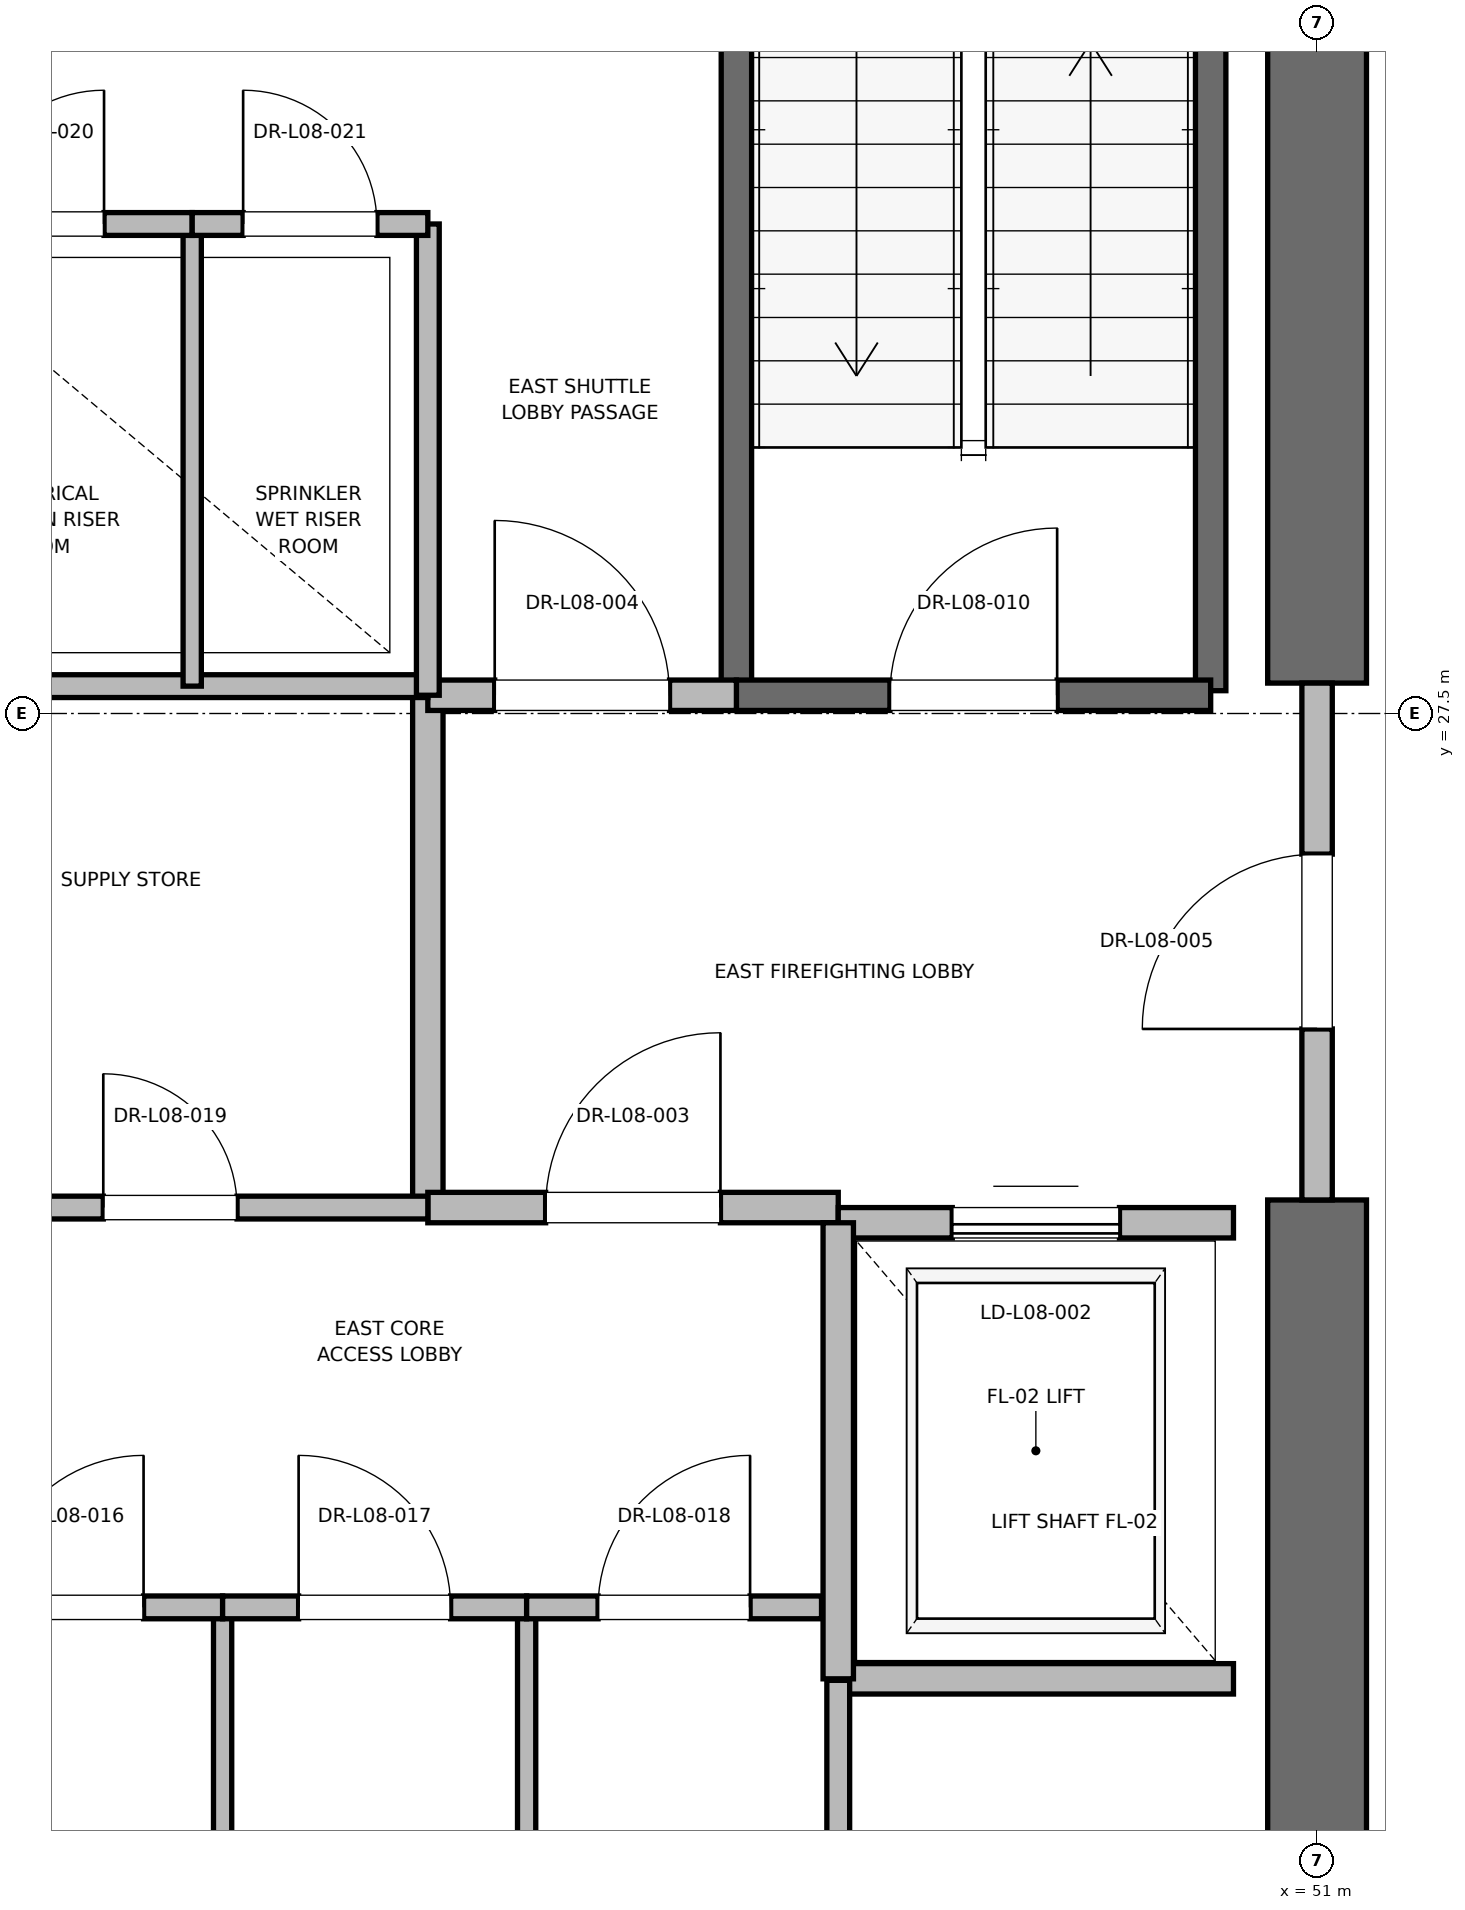
"""IFC4 building model, lengths in metres.
Left out: names, types, materials, properties, quantities, classifications, styles, units other than length and angle.
Written with IfcOpenShell. Run it as: python <this file> out.ifc"""

import sys

from ifc_helpers import new_model, si_unit, direction, frame, frame_2d, origin, place, context, subcontext, project, spatial, rectangle, extrude, element, fill, save


model = new_model("IFC4")
c1 = context("Model", 3, precision=1e-05, world=origin(), true_north=direction((0.0, 1.0)))
c2 = subcontext(c1, "Body", "Model", "MODEL_VIEW")
j1 = project(units=[si_unit("LENGTHUNIT", "METRE"), si_unit("PLANEANGLEUNIT", "RADIAN")], contexts=[c1])
p1 = place(None, origin())
s1 = spatial("IfcSite", under=j1, at=p1, CompositionType="ELEMENT")
p2 = place(p1, origin())
s2 = spatial("IfcBuilding", under=s1, at=p2, CompositionType="ELEMENT")
p3 = place(p2, frame((0.0, 0.0, 39.6)))
s3 = spatial("IfcBuildingStorey", under=s2, at=p3, CompositionType="ELEMENT", Elevation=39.6)
p4 = place(p3, frame((51.0, 18.5, 0.0), z_axis=(0.0, 0.0, 1.0), x_axis=(0.0, 1.0, 0.0)))
e1 = element("IfcWall", 1, at=p4, inside=s3, PredefinedType="SHEAR", context=c2, shape_type="SweptSolid", body=[
    extrude(rectangle(XDim=5.8, YDim=0.65, at=frame_2d((2.9, 0.0))), origin(), (0.0, 0.0, 1.0), 3.76),
])
p5 = place(p3, frame((51.0, 27.7, 0.0), z_axis=(0.0, 0.0, 1.0), x_axis=(0.0, 1.0, 0.0)))
e2 = element("IfcWall", 2, at=p5, inside=s3, PredefinedType="SHEAR", context=c2, shape_type="SweptSolid", body=[
    extrude(rectangle(XDim=8.8, YDim=0.65, at=frame_2d((4.4, 0.0))), origin(), (0.0, 0.0, 1.0), 3.76),
])
p6 = place(p3, frame((50.3, 27.65, 0.0), z_axis=(0.0, 0.0, 1.0), x_axis=(0.0, 1.0, 0.0)))
e3 = element("IfcWall", 3, at=p6, inside=s3, PredefinedType="SOLIDWALL", context=c2, shape_type="SweptSolid", body=[
    extrude(rectangle(XDim=8.15, YDim=0.2, at=frame_2d((4.075, 0.0))), origin(), (0.0, 0.0, 1.0), 3.76),
])
p7 = place(p3, frame((47.18, 27.62, 0.0), z_axis=(0.0, 0.0, 1.0), x_axis=(0.0, 1.0, 0.0)))
e4 = element("IfcWall", 4, at=p7, inside=s3, PredefinedType="SOLIDWALL", context=c2, shape_type="SweptSolid", body=[
    extrude(rectangle(XDim=8.18, YDim=0.2, at=frame_2d((4.09, 0.0))), origin(), (0.0, 0.0, 1.0), 3.76),
])
p8 = place(p3, frame((47.18, 27.62, 0.0), z_axis=(0.0, 0.0, 1.0), x_axis=(1.0, 0.0, 0.0)))
e5 = element("IfcWall", 5, at=p8, inside=s3, PredefinedType="SOLIDWALL", context=c2, shape_type="SweptSolid", body=[
    extrude(rectangle(XDim=3.12, YDim=0.2, at=frame_2d((1.56, 0.0))), origin(), (0.0, 0.0, 1.0), 3.76),
])
p9 = place(p8, frame((1.01, 0.0, 0.0)))
e6 = element("IfcOpeningElement", 6, at=p9, cuts=e5, PredefinedType="OPENING", context=c2, shape_type="SweptSolid", body=[
    extrude(rectangle(XDim=1.1, YDim=2.15, at=frame_2d((0.55, 1.075))), frame((0.0, 0.1, 0.0), z_axis=(0.0, -1.0, 0.0), x_axis=(1.0, 0.0, 0.0)), (0.0, 0.0, 1.0), 0.2),
])
p10 = place(p3, frame((45.15, 24.25, 0.0), z_axis=(0.0, 0.0, 1.0), x_axis=(0.0, 1.0, 0.0)))
e7 = element("IfcWall", 7, at=p10, inside=s3, PredefinedType="PARTITIONING", context=c2, shape_type="SweptSolid", body=[
    extrude(rectangle(XDim=3.37, YDim=0.2, at=frame_2d((1.685, 0.0))), origin(), (0.0, 0.0, 1.0), 3.76),
])
p11 = place(p3, frame((45.15, 24.25, 0.0), z_axis=(0.0, 0.0, 1.0), x_axis=(1.0, 0.0, 0.0)))
e8 = element("IfcWall", 8, at=p11, inside=s3, PredefinedType="PARTITIONING", context=c2, shape_type="SweptSolid", body=[
    extrude(rectangle(XDim=2.7, YDim=0.2, at=frame_2d((1.35, 0.0))), origin(), (0.0, 0.0, 1.0), 3.76),
])
p12 = place(p11, frame((0.775, 0.0, 0.0)))
e9 = element("IfcOpeningElement", 9, at=p12, cuts=e8, PredefinedType="OPENING", context=c2, shape_type="SweptSolid", body=[
    extrude(rectangle(XDim=1.15, YDim=2.2, at=frame_2d((0.575, 1.1))), frame((0.0, 0.1, 0.0), z_axis=(0.0, -1.0, 0.0), x_axis=(1.0, 0.0, 0.0)), (0.0, 0.0, 1.0), 0.2),
])
p13 = place(p3, frame((45.15, 27.62, 0.0), z_axis=(0.0, 0.0, 1.0), x_axis=(1.0, 0.0, 0.0)))
e10 = element("IfcWall", 10, at=p13, inside=s3, PredefinedType="PARTITIONING", context=c2, shape_type="SweptSolid", body=[
    extrude(rectangle(XDim=2.03, YDim=0.2, at=frame_2d((1.015, 0.0))), origin(), (0.0, 0.0, 1.0), 3.76),
])
p14 = place(p13, frame((0.44, 0.0, 0.0)))
e11 = element("IfcOpeningElement", 11, at=p14, cuts=e10, PredefinedType="OPENING", context=c2, shape_type="SweptSolid", body=[
    extrude(rectangle(XDim=1.15, YDim=2.2, at=frame_2d((0.575, 1.1))), frame((0.0, 0.1, 0.0), z_axis=(0.0, -1.0, 0.0), x_axis=(1.0, 0.0, 0.0)), (0.0, 0.0, 1.0), 0.2),
])
p15 = place(p3, frame((51.0, 24.3, 0.0), z_axis=(0.0, 0.0, 1.0), x_axis=(0.0, 1.0, 0.0)))
e12 = element("IfcWall", 12, at=p15, inside=s3, PredefinedType="PARTITIONING", context=c2, shape_type="SweptSolid", body=[
    extrude(rectangle(XDim=3.4, YDim=0.2, at=frame_2d((1.7, 0.0))), origin(), (0.0, 0.0, 1.0), 2.54),
])
p16 = place(p15, frame((1.125, 0.0, 0.0)))
e13 = element("IfcOpeningElement", 13, at=p16, cuts=e12, PredefinedType="OPENING", context=c2, shape_type="SweptSolid", body=[
    extrude(rectangle(XDim=1.15, YDim=2.2, at=frame_2d((0.575, 1.1))), frame((0.0, 0.1, 0.0), z_axis=(0.0, -1.0, 0.0), x_axis=(1.0, 0.0, 0.0)), (0.0, 0.0, 1.0), 0.2),
])
p17 = place(p3, frame((47.85, 21.15, 0.0), z_axis=(0.0, 0.0, 1.0), x_axis=(1.0, 0.0, 0.0)))
e14 = element("IfcWall", 14, at=p17, inside=s3, PredefinedType="SOLIDWALL", context=c2, shape_type="SweptSolid", body=[
    extrude(rectangle(XDim=2.6, YDim=0.2, at=frame_2d((1.3, 0.0))), origin(), (0.0, 0.0, 1.0), 3.76),
])
p18 = place(p3, frame((50.45, 24.15, 0.0), z_axis=(0.0, 0.0, 1.0), x_axis=(-1.0, 0.0, 0.0)))
e15 = element("IfcWall", 15, at=p18, inside=s3, PredefinedType="SOLIDWALL", context=c2, shape_type="SweptSolid", body=[
    extrude(rectangle(XDim=2.6, YDim=0.2, at=frame_2d((1.3, 0.0))), origin(), (0.0, 0.0, 1.0), 2.54),
])
p19 = place(p18, frame((0.75, 0.0, 0.0)))
e16 = element("IfcOpeningElement", 16, at=p19, cuts=e15, PredefinedType="OPENING", context=c2, shape_type="SweptSolid", body=[
    extrude(rectangle(XDim=1.1, YDim=2.2, at=frame_2d((0.55, 1.1))), frame((0.0, 0.1, 0.0), z_axis=(0.0, -1.0, 0.0), x_axis=(1.0, 0.0, 0.0)), (0.0, 0.0, 1.0), 0.2),
])
p20 = place(p3, frame((47.85, 24.15, 0.0), z_axis=(0.0, 0.0, 1.0), x_axis=(0.0, -1.0, 0.0)))
e17 = element("IfcWall", 17, at=p20, inside=s3, PredefinedType="SOLIDWALL", context=c2, shape_type="SweptSolid", body=[
    extrude(rectangle(XDim=3.0, YDim=0.2, at=frame_2d((1.5, 0.0))), origin(), (0.0, 0.0, 1.0), 3.76),
])
p21 = place(p3, frame((41.56, 27.68, 0.0), z_axis=(0.0, 0.0, 1.0), x_axis=(1.0, 0.0, 0.0)))
e18 = element("IfcWall", 18, at=p21, inside=s3, PredefinedType="PARTITIONING", context=c2, shape_type="SweptSolid", body=[
    extrude(rectangle(XDim=3.59, YDim=0.15, at=frame_2d((1.795, 0.0))), origin(), (0.0, 0.0, 1.0), 2.85),
])
p22 = place(p3, frame((47.85, 18.6, 0.0), z_axis=(0.0, 0.0, 1.0), x_axis=(0.0, 1.0, 0.0)))
e19 = element("IfcWall", 19, at=p22, inside=s3, PredefinedType="PARTITIONING", context=c2, shape_type="SweptSolid", body=[
    extrude(rectangle(XDim=2.54, YDim=0.15, at=frame_2d((1.27, 0.0))), origin(), (0.0, 0.0, 1.0), 2.85),
])
for number, where, z_axis, x_axis in (
    (20, (43.8, 18.6, 0.0), (0.0, 0.0, 1.0), (0.0, 1.0, 0.0)),
    (21, (45.8, 18.6, 0.0), (0.0, 0.0, 1.0), (0.0, 1.0, 0.0)),
):
    element("IfcWall", number, at=place(p3, frame(where, z_axis=z_axis, x_axis=x_axis)), inside=s3, PredefinedType="PARTITIONING", context=c2, shape_type="SweptSolid", body=[
        extrude(rectangle(XDim=3.02, YDim=0.12, at=frame_2d((1.51, 0.0))), origin(), (0.0, 0.0, 1.0), 2.85),
    ])
p23 = place(p3, frame((41.76, 21.62, 0.0), z_axis=(0.0, 0.0, 1.0), x_axis=(1.0, 0.0, 0.0)))
e22 = element("IfcWall", 22, at=p23, inside=s3, PredefinedType="PARTITIONING", context=c2, shape_type="SweptSolid", body=[
    extrude(rectangle(XDim=2.04, YDim=0.15, at=frame_2d((1.02, 0.0))), origin(), (0.0, 0.0, 1.0), 2.85),
])
p24 = place(p23, frame((0.52, 0.0, 0.0)))
e23 = element("IfcOpeningElement", 23, at=p24, cuts=e22, PredefinedType="OPENING", context=c2, shape_type="SweptSolid", body=[
    extrude(rectangle(XDim=1.0, YDim=2.15, at=frame_2d((0.5, 1.075))), frame((0.0, 0.075, 0.0), z_axis=(0.0, -1.0, 0.0), x_axis=(1.0, 0.0, 0.0)), (0.0, 0.0, 1.0), 0.15),
])
p25 = place(p3, frame((43.8, 21.62, 0.0), z_axis=(0.0, 0.0, 1.0), x_axis=(1.0, 0.0, 0.0)))
e24 = element("IfcWall", 24, at=p25, inside=s3, PredefinedType="PARTITIONING", context=c2, shape_type="SweptSolid", body=[
    extrude(rectangle(XDim=2.0, YDim=0.15, at=frame_2d((1.0, 0.0))), origin(), (0.0, 0.0, 1.0), 2.85),
])
p26 = place(p25, frame((0.5, 0.0, 0.0)))
e25 = element("IfcOpeningElement", 25, at=p26, cuts=e24, PredefinedType="OPENING", context=c2, shape_type="SweptSolid", body=[
    extrude(rectangle(XDim=1.0, YDim=2.15, at=frame_2d((0.5, 1.075))), frame((0.0, 0.075, 0.0), z_axis=(0.0, -1.0, 0.0), x_axis=(1.0, 0.0, 0.0)), (0.0, 0.0, 1.0), 0.15),
])
p27 = place(p3, frame((45.8, 21.62, 0.0), z_axis=(0.0, 0.0, 1.0), x_axis=(1.0, 0.0, 0.0)))
e26 = element("IfcWall", 26, at=p27, inside=s3, PredefinedType="PARTITIONING", context=c2, shape_type="SweptSolid", body=[
    extrude(rectangle(XDim=1.94, YDim=0.15, at=frame_2d((0.97, 0.0))), origin(), (0.0, 0.0, 1.0), 2.85),
])
p28 = place(p27, frame((0.47, 0.0, 0.0)))
e27 = element("IfcOpeningElement", 27, at=p28, cuts=e26, PredefinedType="OPENING", context=c2, shape_type="SweptSolid", body=[
    extrude(rectangle(XDim=1.0, YDim=2.15, at=frame_2d((0.5, 1.075))), frame((0.0, 0.075, 0.0), z_axis=(0.0, -1.0, 0.0), x_axis=(1.0, 0.0, 0.0)), (0.0, 0.0, 1.0), 0.15),
])
p29 = place(p3, frame((41.76, 24.25, 0.0), z_axis=(0.0, 0.0, 1.0), x_axis=(1.0, 0.0, 0.0)))
e28 = element("IfcWall", 28, at=p29, inside=s3, PredefinedType="PARTITIONING", context=c2, shape_type="SweptSolid", body=[
    extrude(rectangle(XDim=3.39, YDim=0.15, at=frame_2d((1.695, 0.0))), origin(), (0.0, 0.0, 1.0), 2.85),
])
p30 = place(p29, frame((1.255, 0.0, 0.0)))
e29 = element("IfcOpeningElement", 29, at=p30, cuts=e28, PredefinedType="OPENING", context=c2, shape_type="SweptSolid", body=[
    extrude(rectangle(XDim=0.88, YDim=2.1, at=frame_2d((0.44, 1.05))), frame((0.0, 0.075, 0.0), z_axis=(0.0, -1.0, 0.0), x_axis=(1.0, 0.0, 0.0)), (0.0, 0.0, 1.0), 0.15),
])
p31 = place(p3, frame((45.15, 27.62, 0.0), z_axis=(0.0, 0.0, 1.0), x_axis=(0.0, 1.0, 0.0)))
e30 = element("IfcWall", 30, at=p31, inside=s3, PredefinedType="PARTITIONING", context=c2, shape_type="SweptSolid", body=[
    extrude(rectangle(XDim=3.1, YDim=0.15, at=frame_2d((1.55, 0.0))), origin(), (0.0, 0.0, 1.0), 2.85),
])
p32 = place(p3, frame((43.6, 27.68, 0.0), z_axis=(0.0, 0.0, 1.0), x_axis=(0.0, 1.0, 0.0)))
e31 = element("IfcWall", 31, at=p32, inside=s3, PredefinedType="PARTITIONING", context=c2, shape_type="SweptSolid", body=[
    extrude(rectangle(XDim=3.04, YDim=0.12, at=frame_2d((1.52, 0.0))), origin(), (0.0, 0.0, 1.0), 2.85),
])
p33 = place(p3, frame((41.56, 30.72, 0.0), z_axis=(0.0, 0.0, 1.0), x_axis=(1.0, 0.0, 0.0)))
e32 = element("IfcWall", 32, at=p33, inside=s3, PredefinedType="PARTITIONING", context=c2, shape_type="SweptSolid", body=[
    extrude(rectangle(XDim=2.04, YDim=0.15, at=frame_2d((1.02, 0.0))), origin(), (0.0, 0.0, 1.0), 2.85),
])
p34 = place(p33, frame((0.58, 0.0, 0.0)))
e33 = element("IfcOpeningElement", 33, at=p34, cuts=e32, PredefinedType="OPENING", context=c2, shape_type="SweptSolid", body=[
    extrude(rectangle(XDim=0.88, YDim=2.1, at=frame_2d((0.44, 1.05))), frame((0.0, 0.075, 0.0), z_axis=(0.0, -1.0, 0.0), x_axis=(1.0, 0.0, 0.0)), (0.0, 0.0, 1.0), 0.15),
])
p35 = place(p3, frame((43.6, 30.72, 0.0), z_axis=(0.0, 0.0, 1.0), x_axis=(1.0, 0.0, 0.0)))
e34 = element("IfcWall", 34, at=p35, inside=s3, PredefinedType="PARTITIONING", context=c2, shape_type="SweptSolid", body=[
    extrude(rectangle(XDim=1.55, YDim=0.15, at=frame_2d((0.775, 0.0))), origin(), (0.0, 0.0, 1.0), 2.85),
])
p36 = place(p35, frame((0.335, 0.0, 0.0)))
e35 = element("IfcOpeningElement", 35, at=p36, cuts=e34, PredefinedType="OPENING", context=c2, shape_type="SweptSolid", body=[
    extrude(rectangle(XDim=0.88, YDim=2.1, at=frame_2d((0.44, 1.05))), frame((0.0, 0.075, 0.0), z_axis=(0.0, -1.0, 0.0), x_axis=(1.0, 0.0, 0.0)), (0.0, 0.0, 1.0), 0.15),
])
p37 = place(p9, origin())
e36 = element("IfcDoor", 36, at=p37, inside=s3, OperationType="SINGLE_SWING_RIGHT", PredefinedType="DOOR", context=c2, shape_type="SweptSolid", body=[
    extrude(rectangle(XDim=1.1, YDim=2.15, at=frame_2d((0.55, 1.075))), frame((0.0, 0.025, 0.0), z_axis=(0.0, -1.0, 0.0), x_axis=(1.0, 0.0, 0.0)), (0.0, 0.0, 1.0), 0.05),
])
fill(e6, e36)
p38 = place(p12, origin())
e37 = element("IfcDoor", 37, at=p38, inside=s3, OperationType="SINGLE_SWING_RIGHT", PredefinedType="DOOR", context=c2, shape_type="SweptSolid", body=[
    extrude(rectangle(XDim=1.15, YDim=2.2, at=frame_2d((0.575, 1.1))), frame((0.0, 0.025, 0.0), z_axis=(0.0, -1.0, 0.0), x_axis=(1.0, 0.0, 0.0)), (0.0, 0.0, 1.0), 0.05),
])
fill(e9, e37)
p39 = place(p14, origin())
e38 = element("IfcDoor", 38, at=p39, inside=s3, OperationType="SINGLE_SWING_LEFT", PredefinedType="DOOR", context=c2, shape_type="SweptSolid", body=[
    extrude(rectangle(XDim=1.15, YDim=2.2, at=frame_2d((0.575, 1.1))), frame((0.0, 0.025, 0.0), z_axis=(0.0, -1.0, 0.0), x_axis=(1.0, 0.0, 0.0)), (0.0, 0.0, 1.0), 0.05),
])
fill(e11, e38)
p40 = place(p16, origin())
e39 = element("IfcDoor", 39, at=p40, inside=s3, OperationType="SINGLE_SWING_LEFT", PredefinedType="DOOR", context=c2, shape_type="SweptSolid", body=[
    extrude(rectangle(XDim=1.15, YDim=2.2, at=frame_2d((0.575, 1.1))), frame((0.0, 0.025, 0.0), z_axis=(0.0, -1.0, 0.0), x_axis=(1.0, 0.0, 0.0)), (0.0, 0.0, 1.0), 0.05),
])
fill(e13, e39)
p41 = place(p19, origin())
e40 = element("IfcDoor", 40, at=p41, inside=s3, OperationType="SLIDING_TO_RIGHT", PredefinedType="DOOR", context=c2, shape_type="SweptSolid", body=[
    extrude(rectangle(XDim=1.1, YDim=2.2, at=frame_2d((0.55, 1.1))), frame((0.0, 0.025, 0.0), z_axis=(0.0, -1.0, 0.0), x_axis=(1.0, 0.0, 0.0)), (0.0, 0.0, 1.0), 0.05),
])
fill(e16, e40)
p42 = place(p24, origin())
e41 = element("IfcDoor", 41, at=p42, inside=s3, OperationType="SINGLE_SWING_RIGHT", PredefinedType="DOOR", context=c2, shape_type="SweptSolid", body=[
    extrude(rectangle(XDim=1.0, YDim=2.15, at=frame_2d((0.5, 1.075))), frame((0.0, 0.025, 0.0), z_axis=(0.0, -1.0, 0.0), x_axis=(1.0, 0.0, 0.0)), (0.0, 0.0, 1.0), 0.05),
])
fill(e23, e41)
p43 = place(p26, origin())
e42 = element("IfcDoor", 42, at=p43, inside=s3, OperationType="SINGLE_SWING_LEFT", PredefinedType="DOOR", context=c2, shape_type="SweptSolid", body=[
    extrude(rectangle(XDim=1.0, YDim=2.15, at=frame_2d((0.5, 1.075))), frame((0.0, 0.025, 0.0), z_axis=(0.0, -1.0, 0.0), x_axis=(1.0, 0.0, 0.0)), (0.0, 0.0, 1.0), 0.05),
])
fill(e25, e42)
p44 = place(p28, origin())
e43 = element("IfcDoor", 43, at=p44, inside=s3, OperationType="SINGLE_SWING_RIGHT", PredefinedType="DOOR", context=c2, shape_type="SweptSolid", body=[
    extrude(rectangle(XDim=1.0, YDim=2.15, at=frame_2d((0.5, 1.075))), frame((0.0, 0.025, 0.0), z_axis=(0.0, -1.0, 0.0), x_axis=(1.0, 0.0, 0.0)), (0.0, 0.0, 1.0), 0.05),
])
fill(e27, e43)
p45 = place(p30, origin())
e44 = element("IfcDoor", 44, at=p45, inside=s3, OperationType="SINGLE_SWING_LEFT", PredefinedType="DOOR", context=c2, shape_type="SweptSolid", body=[
    extrude(rectangle(XDim=0.88, YDim=2.1, at=frame_2d((0.44, 1.05))), frame((0.0, 0.025, 0.0), z_axis=(0.0, -1.0, 0.0), x_axis=(1.0, 0.0, 0.0)), (0.0, 0.0, 1.0), 0.05),
])
fill(e29, e44)
p46 = place(p34, origin())
e45 = element("IfcDoor", 45, at=p46, inside=s3, OperationType="SINGLE_SWING_RIGHT", PredefinedType="DOOR", context=c2, shape_type="SweptSolid", body=[
    extrude(rectangle(XDim=0.88, YDim=2.1, at=frame_2d((0.44, 1.05))), frame((0.0, 0.025, 0.0), z_axis=(0.0, -1.0, 0.0), x_axis=(1.0, 0.0, 0.0)), (0.0, 0.0, 1.0), 0.05),
])
fill(e33, e45)
p47 = place(p36, origin())
e46 = element("IfcDoor", 46, at=p47, inside=s3, OperationType="SINGLE_SWING_LEFT", PredefinedType="DOOR", context=c2, shape_type="SweptSolid", body=[
    extrude(rectangle(XDim=0.88, YDim=2.1, at=frame_2d((0.44, 1.05))), frame((0.0, 0.025, 0.0), z_axis=(0.0, -1.0, 0.0), x_axis=(1.0, 0.0, 0.0)), (0.0, 0.0, 1.0), 0.05),
])
fill(e35, e46)
save(model, sys.argv[1])
